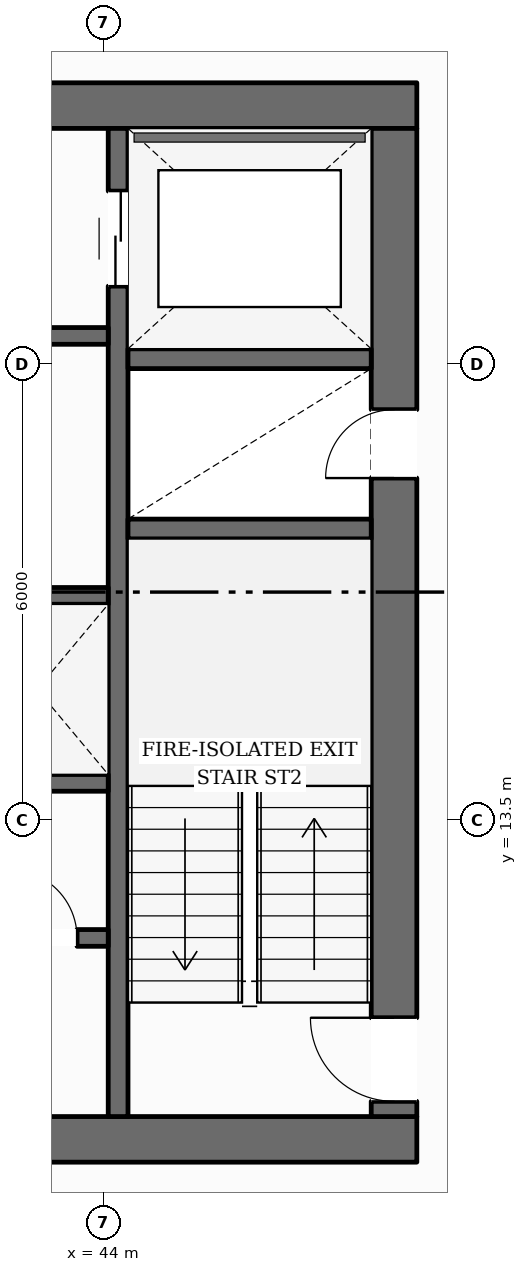
"""IFC4 building model, lengths in metres.
Left out: names, types, materials, properties, quantities, classifications, styles, units other than length and angle.
Written with IfcOpenShell. Run it as: python <this file> out.ifc"""

import sys

from ifc_helpers import new_model, si_unit, direction, frame, frame_2d, origin, place, context, subcontext, project, spatial, rectangle, extrude, element, fill, save


model = new_model("IFC4")
c1 = context("Model", 3, precision=1e-05, world=origin(), true_north=direction((0.0, 1.0)))
c2 = subcontext(c1, "Body", "Model", "MODEL_VIEW")
j1 = project(units=[si_unit("LENGTHUNIT", "METRE"), si_unit("PLANEANGLEUNIT", "RADIAN")], contexts=[c1])
p1 = place(None, origin())
s1 = spatial("IfcSite", under=j1, at=p1, CompositionType="ELEMENT")
p2 = place(p1, origin())
s2 = spatial("IfcBuilding", under=s1, at=p2, CompositionType="ELEMENT")
p3 = place(p2, frame((0.0, 0.0, 21.4)))
s3 = spatial("IfcBuildingStorey", under=s2, at=p3, CompositionType="ELEMENT", Elevation=21.4)
p4 = place(p3, frame((27.88, 9.3, 0.0), z_axis=(0.0, 0.0, 1.0), x_axis=(1.0, 0.0, 0.0)))
e1 = element("IfcWall", 1, at=p4, inside=s3, PredefinedType="SOLIDWALL", context=c2, shape_type="SweptSolid", body=[
    extrude(rectangle(XDim=20.24, YDim=0.6, at=frame_2d((10.12, 0.0))), origin(), (0.0, 0.0, 1.0), 3.59),
])
p5 = place(p4, frame((10.62, 0.0, 0.0)))
e2 = element("IfcOpeningElement", 2, at=p5, cuts=e1, PredefinedType="OPENING", context=c2, shape_type="SweptSolid", body=[
    extrude(rectangle(XDim=1.4, YDim=2.2, at=frame_2d((0.7, 1.1))), frame((0.0, 0.31, 0.0), z_axis=(0.0, -1.0, 0.0), x_axis=(1.0, 0.0, 0.0)), (0.0, 0.0, 1.0), 0.62),
])
p6 = place(p3, frame((27.88, 22.9, 0.0), z_axis=(0.0, 0.0, 1.0), x_axis=(1.0, 0.0, 0.0)))
e3 = element("IfcWall", 3, at=p6, inside=s3, PredefinedType="SOLIDWALL", context=c2, shape_type="SweptSolid", body=[
    extrude(rectangle(XDim=20.24, YDim=0.6, at=frame_2d((10.12, 0.0))), origin(), (0.0, 0.0, 1.0), 3.59),
])
p7 = place(p6, frame((6.395, 0.0, 0.0)))
e4 = element("IfcOpeningElement", 4, at=p7, cuts=e3, PredefinedType="OPENING", context=c2, shape_type="SweptSolid", body=[
    extrude(rectangle(XDim=1.05, YDim=2.15, at=frame_2d((0.525, 1.075))), frame((0.0, 0.31, 0.0), z_axis=(0.0, -1.0, 0.0), x_axis=(1.0, 0.0, 0.0)), (0.0, 0.0, 1.0), 0.62),
])
p8 = place(p6, frame((12.795, 0.0, 0.0)))
e5 = element("IfcOpeningElement", 5, at=p8, cuts=e3, PredefinedType="OPENING", context=c2, shape_type="SweptSolid", body=[
    extrude(rectangle(XDim=1.05, YDim=2.15, at=frame_2d((0.525, 1.075))), frame((0.0, 0.31, 0.0), z_axis=(0.0, -1.0, 0.0), x_axis=(1.0, 0.0, 0.0)), (0.0, 0.0, 1.0), 0.62),
])
p9 = place(p3, frame((47.82, 9.6, 0.0), z_axis=(0.0, 0.0, 1.0), x_axis=(0.0, 1.0, 0.0)))
e6 = element("IfcWall", 6, at=p9, inside=s3, PredefinedType="SOLIDWALL", context=c2, shape_type="SweptSolid", body=[
    extrude(rectangle(XDim=13.0, YDim=0.6, at=frame_2d((6.5, 0.0))), origin(), (0.0, 0.0, 1.0), 3.59),
])
p10 = place(p9, frame((0.2, 0.0, 0.0)))
e7 = element("IfcOpeningElement", 7, at=p10, cuts=e6, PredefinedType="OPENING", context=c2, shape_type="SweptSolid", body=[
    extrude(rectangle(XDim=1.1, YDim=2.15, at=frame_2d((0.55, 1.075))), frame((0.0, 0.31, 0.0), z_axis=(0.0, -1.0, 0.0), x_axis=(1.0, 0.0, 0.0)), (0.0, 0.0, 1.0), 0.62),
])
p11 = place(p9, frame((8.4, 0.0, 0.0)))
e8 = element("IfcOpeningElement", 8, at=p11, cuts=e6, PredefinedType="OPENING", context=c2, shape_type="SweptSolid", body=[
    extrude(rectangle(XDim=0.9, YDim=2.1, at=frame_2d((0.45, 1.05))), frame((0.0, 0.31, 0.0), z_axis=(0.0, -1.0, 0.0), x_axis=(1.0, 0.0, 0.0)), (0.0, 0.0, 1.0), 0.62),
])
p12 = place(p3, frame((44.19, 9.6, 0.0), z_axis=(0.0, 0.0, 1.0), x_axis=(0.0, 1.0, 0.0)))
e9 = element("IfcWall", 9, at=p12, inside=s3, PredefinedType="SHEAR", context=c2, shape_type="SweptSolid", body=[
    extrude(rectangle(XDim=13.0, YDim=0.26, at=frame_2d((6.5, 0.0))), origin(), (0.0, 0.0, 1.0), 3.59),
])
p13 = place(p12, frame((10.925, 0.0, 0.0)))
e10 = element("IfcOpeningElement", 10, at=p13, cuts=e9, PredefinedType="OPENING", context=c2, shape_type="SweptSolid", body=[
    extrude(rectangle(XDim=1.25, YDim=2.25, at=frame_2d((0.625, 1.125))), frame((0.0, 0.14, 0.0), z_axis=(0.0, -1.0, 0.0), x_axis=(1.0, 0.0, 0.0)), (0.0, 0.0, 1.0), 0.28),
])
for number, where, z_axis, x_axis in (
    (11, (44.32, 17.33, 0.0), (0.0, 0.0, 1.0), (1.0, 0.0, 0.0)),
    (12, (44.32, 19.57, 0.0), (0.0, 0.0, 1.0), (1.0, 0.0, 0.0)),
):
    element("IfcWall", number, at=place(p3, frame(where, z_axis=z_axis, x_axis=x_axis)), inside=s3, PredefinedType="SHEAR", context=c2, shape_type="SweptSolid", body=[
        extrude(rectangle(XDim=3.2, YDim=0.26, at=frame_2d((1.6, 0.0))), origin(), (0.0, 0.0, 1.0), 3.59),
    ])
p14 = place(p3, frame((31.94, 19.87, 0.0), z_axis=(0.0, 0.0, 1.0), x_axis=(1.0, 0.0, 0.0)))
e13 = element("IfcWall", 13, at=p14, inside=s3, PredefinedType="SOLIDWALL", context=c2, shape_type="SweptSolid", body=[
    extrude(rectangle(XDim=12.12, YDim=0.22, at=frame_2d((6.06, 0.0))), origin(), (0.0, 0.0, 1.0), 3.59),
])
p15 = place(p14, frame((6.3, 0.0, 0.0)))
e14 = element("IfcOpeningElement", 14, at=p15, cuts=e13, PredefinedType="OPENING", context=c2, shape_type="SweptSolid", body=[
    extrude(rectangle(XDim=1.1, YDim=2.15, at=frame_2d((0.55, 1.075))), frame((0.0, 0.12, 0.0), z_axis=(0.0, -1.0, 0.0), x_axis=(1.0, 0.0, 0.0)), (0.0, 0.0, 1.0), 0.24),
])
p16 = place(p14, frame((9.51, 0.0, 0.0)))
e15 = element("IfcOpeningElement", 15, at=p16, cuts=e13, PredefinedType="OPENING", context=c2, shape_type="SweptSolid", body=[
    extrude(rectangle(XDim=0.9, YDim=2.1, at=frame_2d((0.45, 1.05))), frame((0.0, 0.12, 0.0), z_axis=(0.0, -1.0, 0.0), x_axis=(1.0, 0.0, 0.0)), (0.0, 0.0, 1.0), 0.24),
])
p17 = place(p3, frame((31.94, 16.45, 0.0), z_axis=(0.0, 0.0, 1.0), x_axis=(1.0, 0.0, 0.0)))
e16 = element("IfcWall", 16, at=p17, inside=s3, PredefinedType="SOLIDWALL", context=c2, shape_type="SweptSolid", body=[
    extrude(rectangle(XDim=12.12, YDim=0.22, at=frame_2d((6.06, 0.0))), origin(), (0.0, 0.0, 1.0), 3.59),
])
p18 = place(p3, frame((31.94, 13.99, 0.0), z_axis=(0.0, 0.0, 1.0), x_axis=(1.0, 0.0, 0.0)))
e17 = element("IfcWall", 17, at=p18, inside=s3, PredefinedType="SOLIDWALL", context=c2, shape_type="SweptSolid", body=[
    extrude(rectangle(XDim=12.12, YDim=0.22, at=frame_2d((6.06, 0.0))), origin(), (0.0, 0.0, 1.0), 3.59),
])
p19 = place(p18, frame((0.385, 0.0, 0.0)))
e18 = element("IfcOpeningElement", 18, at=p19, cuts=e17, PredefinedType="OPENING", context=c2, shape_type="SweptSolid", body=[
    extrude(rectangle(XDim=1.1, YDim=2.2, at=frame_2d((0.55, 1.1))), frame((0.0, 0.12, 0.0), z_axis=(0.0, -1.0, 0.0), x_axis=(1.0, 0.0, 0.0)), (0.0, 0.0, 1.0), 0.24),
])
p20 = place(p18, frame((2.435, 0.0, 0.0)))
e19 = element("IfcOpeningElement", 19, at=p20, cuts=e17, PredefinedType="OPENING", context=c2, shape_type="SweptSolid", body=[
    extrude(rectangle(XDim=1.1, YDim=2.2, at=frame_2d((0.55, 1.1))), frame((0.0, 0.12, 0.0), z_axis=(0.0, -1.0, 0.0), x_axis=(1.0, 0.0, 0.0)), (0.0, 0.0, 1.0), 0.24),
])
p21 = place(p18, frame((4.485, 0.0, 0.0)))
e20 = element("IfcOpeningElement", 20, at=p21, cuts=e17, PredefinedType="OPENING", context=c2, shape_type="SweptSolid", body=[
    extrude(rectangle(XDim=1.1, YDim=2.2, at=frame_2d((0.55, 1.1))), frame((0.0, 0.12, 0.0), z_axis=(0.0, -1.0, 0.0), x_axis=(1.0, 0.0, 0.0)), (0.0, 0.0, 1.0), 0.24),
])
p22 = place(p3, frame((40.28, 11.95, 0.0), z_axis=(0.0, 0.0, 1.0), x_axis=(1.0, 0.0, 0.0)))
e21 = element("IfcWall", 21, at=p22, inside=s3, PredefinedType="SOLIDWALL", context=c2, shape_type="SweptSolid", body=[
    extrude(rectangle(XDim=3.78, YDim=0.22, at=frame_2d((1.89, 0.0))), origin(), (0.0, 0.0, 1.0), 3.59),
])
p23 = place(p22, frame((0.62, 0.0, 0.0)))
e22 = element("IfcOpeningElement", 22, at=p23, cuts=e21, PredefinedType="OPENING", context=c2, shape_type="SweptSolid", body=[
    extrude(rectangle(XDim=0.9, YDim=2.1, at=frame_2d((0.45, 1.05))), frame((0.0, 0.12, 0.0), z_axis=(0.0, -1.0, 0.0), x_axis=(1.0, 0.0, 0.0)), (0.0, 0.0, 1.0), 0.24),
])
p24 = place(p22, frame((2.47, 0.0, 0.0)))
e23 = element("IfcOpeningElement", 23, at=p24, cuts=e21, PredefinedType="OPENING", context=c2, shape_type="SweptSolid", body=[
    extrude(rectangle(XDim=0.9, YDim=2.1, at=frame_2d((0.45, 1.05))), frame((0.0, 0.12, 0.0), z_axis=(0.0, -1.0, 0.0), x_axis=(1.0, 0.0, 0.0)), (0.0, 0.0, 1.0), 0.24),
])
p25 = place(p3, frame((45.837, 44.537, 0.0), z_axis=(0.0, 0.0, 1.0), x_axis=(0.495711630902, -0.868487178367, 0.0)))
e24 = element("IfcWall", 24, at=p25, inside=s3, PredefinedType="STANDARD", context=c2, shape_type="SweptSolid", body=[
    extrude(rectangle(XDim=34.092, YDim=0.38, at=frame_2d((17.046, 0.0))), origin(), (0.0, 0.0, 1.0), 2.97),
])
p26 = place(p25, frame((30.031, 0.0, 0.65)))
e25 = element("IfcOpeningElement", 25, at=p26, cuts=e24, PredefinedType="OPENING", context=c2, shape_type="SweptSolid", body=[
    extrude(rectangle(XDim=1.65, YDim=1.75, at=frame_2d((0.825, 0.875))), frame((0.0, 0.2, 0.0), z_axis=(0.0, -1.0, 0.0), x_axis=(1.0, 0.0, 0.0)), (0.0, 0.0, 1.0), 0.4),
])
p27 = place(p25, frame((24.508, 0.0, 0.65)))
e26 = element("IfcOpeningElement", 26, at=p27, cuts=e24, PredefinedType="OPENING", context=c2, shape_type="SweptSolid", body=[
    extrude(rectangle(XDim=1.65, YDim=1.75, at=frame_2d((0.825, 0.875))), frame((0.0, 0.2, 0.0), z_axis=(0.0, -1.0, 0.0), x_axis=(1.0, 0.0, 0.0)), (0.0, 0.0, 1.0), 0.4),
])
p28 = place(p25, frame((13.462, 0.0, 0.65)))
e27 = element("IfcOpeningElement", 27, at=p28, cuts=e24, PredefinedType="OPENING", context=c2, shape_type="SweptSolid", body=[
    extrude(rectangle(XDim=1.65, YDim=1.75, at=frame_2d((0.825, 0.875))), frame((0.0, 0.2, 0.0), z_axis=(0.0, -1.0, 0.0), x_axis=(1.0, 0.0, 0.0)), (0.0, 0.0, 1.0), 0.4),
])
p29 = place(p25, frame((7.939, 0.0, 0.65)))
e28 = element("IfcOpeningElement", 28, at=p29, cuts=e24, PredefinedType="OPENING", context=c2, shape_type="SweptSolid", body=[
    extrude(rectangle(XDim=1.65, YDim=1.75, at=frame_2d((0.825, 0.875))), frame((0.0, 0.2, 0.0), z_axis=(0.0, -1.0, 0.0), x_axis=(1.0, 0.0, 0.0)), (0.0, 0.0, 1.0), 0.4),
])
p30 = place(p25, frame((2.415, 0.0, 0.65)))
e29 = element("IfcOpeningElement", 29, at=p30, cuts=e24, PredefinedType="OPENING", context=c2, shape_type="SweptSolid", body=[
    extrude(rectangle(XDim=1.65, YDim=1.75, at=frame_2d((0.825, 0.875))), frame((0.0, 0.2, 0.0), z_axis=(0.0, -1.0, 0.0), x_axis=(1.0, 0.0, 0.0)), (0.0, 0.0, 1.0), 0.4),
])
p31 = place(p10, origin())
e30 = element("IfcDoor", 30, at=p31, inside=s3, OperationType="SINGLE_SWING_RIGHT", PredefinedType="DOOR", context=c2, shape_type="SweptSolid", body=[
    extrude(rectangle(XDim=1.1, YDim=2.15, at=frame_2d((0.55, 1.075))), frame((0.0, 0.025, 0.0), z_axis=(0.0, -1.0, 0.0), x_axis=(1.0, 0.0, 0.0)), (0.0, 0.0, 1.0), 0.05),
])
fill(e7, e30)
p32 = place(p11, origin())
e31 = element("IfcDoor", 31, at=p32, inside=s3, OperationType="SINGLE_SWING_LEFT", PredefinedType="DOOR", context=c2, shape_type="SweptSolid", body=[
    extrude(rectangle(XDim=0.9, YDim=2.1, at=frame_2d((0.45, 1.05))), frame((0.0, 0.025, 0.0), z_axis=(0.0, -1.0, 0.0), x_axis=(1.0, 0.0, 0.0)), (0.0, 0.0, 1.0), 0.05),
])
fill(e8, e31)
p33 = place(p13, origin())
e32 = element("IfcDoor", 32, at=p33, inside=s3, OperationType="DOUBLE_DOOR_SLIDING", PredefinedType="DOOR", context=c2, shape_type="SweptSolid", body=[
    extrude(rectangle(XDim=1.25, YDim=2.25, at=frame_2d((0.625, 1.125))), frame((0.0, 0.025, 0.0), z_axis=(0.0, -1.0, 0.0), x_axis=(1.0, 0.0, 0.0)), (0.0, 0.0, 1.0), 0.05),
])
fill(e10, e32)
p34 = place(p24, origin())
e33 = element("IfcDoor", 33, at=p34, inside=s3, OperationType="SINGLE_SWING_LEFT", PredefinedType="DOOR", context=c2, shape_type="SweptSolid", body=[
    extrude(rectangle(XDim=0.9, YDim=2.1, at=frame_2d((0.45, 1.05))), frame((0.0, 0.025, 0.0), z_axis=(0.0, -1.0, 0.0), x_axis=(1.0, 0.0, 0.0)), (0.0, 0.0, 1.0), 0.05),
])
fill(e23, e33)
save(model, sys.argv[1])
